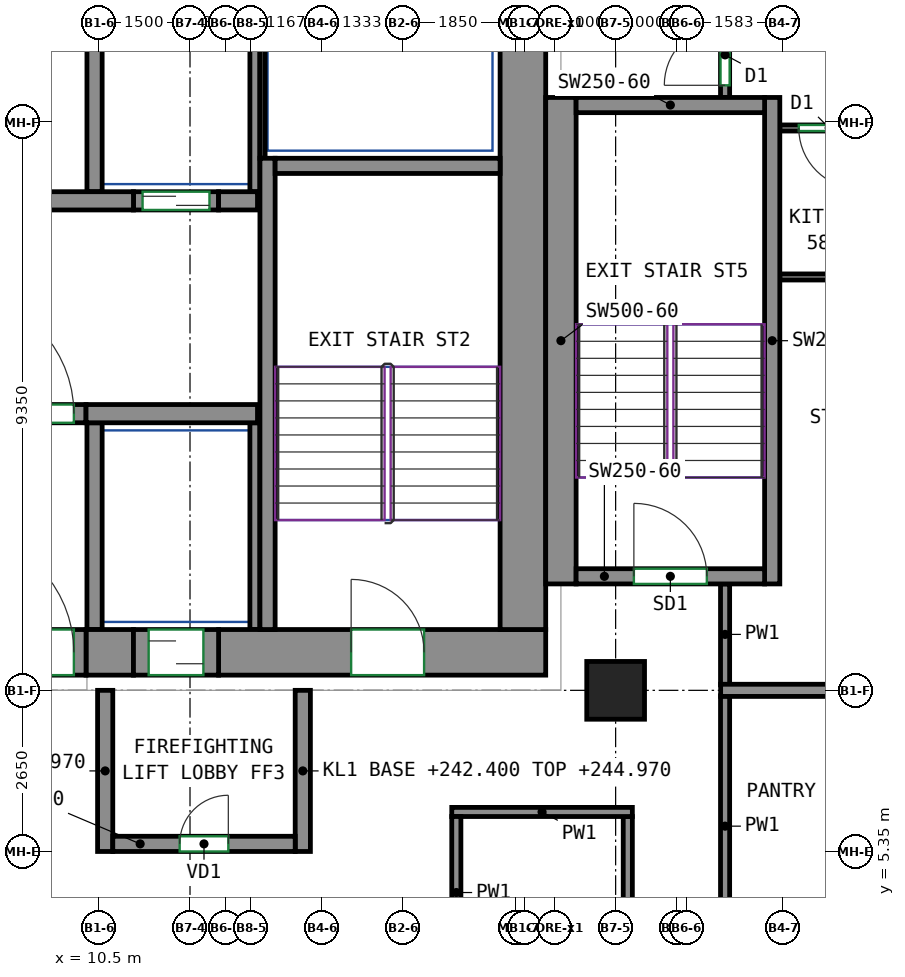
"""IFC4 building model, lengths in metres.
Left out: names, types, materials, properties, quantities, classifications, styles, units other than length and angle.
Written with IfcOpenShell. Run it as: python <this file> out.ifc"""

import sys

from ifc_helpers import new_model, si_unit, direction, frame, frame_2d, origin, origin_2d, place, context, subcontext, project, spatial, rectangle, extrude, source, transform, mapped, element, fill, save


model = new_model("IFC4")
c1 = context("Model", 3, precision=1e-05, world=origin(), true_north=direction((0.0, 1.0)))
c2 = subcontext(c1, "Body", "Model", "MODEL_VIEW")
j1 = project(units=[si_unit("LENGTHUNIT", "METRE"), si_unit("PLANEANGLEUNIT", "RADIAN")], contexts=[c1])
p1 = place(None, origin())
s1 = spatial("IfcSite", under=j1, at=p1, CompositionType="ELEMENT")
p2 = place(p1, origin())
s2 = spatial("IfcBuilding", under=s1, at=p2, CompositionType="ELEMENT")
p3 = place(p2, frame((0.0, 0.0, 242.4)))
s3 = spatial("IfcBuildingStorey", under=s2, at=p3, CompositionType="ELEMENT", Elevation=242.4)
m1 = source(origin(), c2, "Body", "SweptSolid", [
    extrude(rectangle(XDim=0.95, YDim=0.95, at=origin_2d()), origin(), (0.0, 0.0, 1.0), 3.12),
])
p4 = place(p3, frame((19.0, 8.0, 0.0), z_axis=(0.0, 0.0, 1.0), x_axis=(1.0, 0.0, 0.0)))
e1 = element("IfcColumn", 1, at=p4, inside=s3, PredefinedType="COLUMN", context=c2, shape_type="MappedRepresentation", body=[
    mapped(m1, transform((0.0, 0.0, 0.0))),
])
m2 = source(origin(), c2, "Body", "SweptSolid", [
    extrude(rectangle(XDim=0.78, YDim=0.75, at=frame_2d((0.39, 0.0))), origin(), (0.0, 0.0, 1.0), 3.12),
])
p5 = place(p3, frame((10.29, 8.625, 0.0), z_axis=(0.0, 0.0, 1.0), x_axis=(1.0, 0.0, 0.0)))
e2 = element("IfcWall", 2, at=p5, inside=s3, PredefinedType="SHEAR", context=c2, shape_type="MappedRepresentation", body=[
    mapped(m2, transform((0.0, 0.0, 0.0))),
])
m3 = source(origin(), c2, "Body", "SweptSolid", [
    extrude(rectangle(XDim=5.38, YDim=0.75, at=frame_2d((2.69, 0.0))), origin(), (0.0, 0.0, 1.0), 3.12),
])
p6 = place(p3, frame((12.47, 8.625, 0.0), z_axis=(0.0, 0.0, 1.0), x_axis=(1.0, 0.0, 0.0)))
e3 = element("IfcWall", 3, at=p6, inside=s3, PredefinedType="SHEAR", context=c2, shape_type="MappedRepresentation", body=[
    mapped(m3, transform((0.0, 0.0, 0.0))),
])
p7 = place(p6, frame((2.18, 0.0, 0.0)))
e4 = element("IfcOpeningElement", 4, at=p7, cuts=e3, PredefinedType="OPENING", context=c2, shape_type="SweptSolid", body=[
    extrude(rectangle(XDim=1.2, YDim=2.1, at=frame_2d((0.6, 1.05))), frame((0.0, 0.385, 0.0), z_axis=(0.0, -1.0, 0.0), x_axis=(1.0, 0.0, 0.0)), (0.0, 0.0, 1.0), 0.77),
])
m4 = source(origin(), c2, "Body", "SweptSolid", [
    extrude(rectangle(XDim=12.0, YDim=0.75, at=frame_2d((6.0, 0.0))), origin(), (0.0, 0.0, 1.0), 3.12),
])
p8 = place(p3, frame((17.475, 9.0, 0.0), z_axis=(0.0, 0.0, 1.0), x_axis=(0.0, 1.0, 0.0)))
e5 = element("IfcWall", 5, at=p8, inside=s3, PredefinedType="SHEAR", context=c2, shape_type="MappedRepresentation", body=[
    mapped(m4, transform((0.0, 0.0, 0.0))),
])
m5 = source(origin(), c2, "Body", "SweptSolid", [
    extrude(rectangle(XDim=7.75, YDim=0.25, at=frame_2d((3.875, 0.0))), origin(), (0.0, 0.0, 1.0), 3.12),
])
p9 = place(p3, frame((13.275, 9.0, 0.0), z_axis=(0.0, 0.0, 1.0), x_axis=(0.0, 1.0, 0.0)))
e6 = element("IfcWall", 6, at=p9, inside=s3, PredefinedType="SHEAR", context=c2, shape_type="MappedRepresentation", body=[
    mapped(m5, transform((0.0, 0.0, 0.0))),
])
m6 = source(origin(), c2, "Body", "SweptSolid", [
    extrude(rectangle(XDim=3.7, YDim=0.25, at=frame_2d((1.85, 0.0))), origin(), (0.0, 0.0, 1.0), 3.12),
])
p10 = place(p3, frame((13.4, 16.625, 0.0), z_axis=(0.0, 0.0, 1.0), x_axis=(1.0, 0.0, 0.0)))
e7 = element("IfcWall", 7, at=p10, inside=s3, PredefinedType="SHEAR", context=c2, shape_type="MappedRepresentation", body=[
    mapped(m6, transform((0.0, 0.0, 0.0))),
])
m7 = source(origin(), c2, "Body", "SweptSolid", [
    extrude(rectangle(XDim=8.0, YDim=0.5, at=frame_2d((4.0, 0.0))), origin(), (0.0, 0.0, 1.0), 3.12),
])
p11 = place(p3, frame((18.1, 9.75, 0.0), z_axis=(0.0, 0.0, 1.0), x_axis=(0.0, 1.0, 0.0)))
e8 = element("IfcWall", 8, at=p11, inside=s3, PredefinedType="SHEAR", context=c2, shape_type="MappedRepresentation", body=[
    mapped(m7, transform((0.0, 0.0, 0.0))),
])
m8 = source(origin(), c2, "Body", "SweptSolid", [
    extrude(rectangle(XDim=8.0, YDim=0.25, at=frame_2d((4.0, 0.0))), origin(), (0.0, 0.0, 1.0), 3.12),
])
p12 = place(p3, frame((21.575, 9.75, 0.0), z_axis=(0.0, 0.0, 1.0), x_axis=(0.0, 1.0, 0.0)))
e9 = element("IfcWall", 9, at=p12, inside=s3, PredefinedType="SHEAR", context=c2, shape_type="MappedRepresentation", body=[
    mapped(m8, transform((0.0, 0.0, 0.0))),
])
m9 = source(origin(), c2, "Body", "SweptSolid", [
    extrude(rectangle(XDim=3.1, YDim=0.25, at=frame_2d((1.55, 0.0))), origin(), (0.0, 0.0, 1.0), 3.12),
])
p13 = place(p3, frame((18.35, 9.875, 0.0), z_axis=(0.0, 0.0, 1.0), x_axis=(1.0, 0.0, 0.0)))
e10 = element("IfcWall", 10, at=p13, inside=s3, PredefinedType="SHEAR", context=c2, shape_type="MappedRepresentation", body=[
    mapped(m9, transform((0.0, 0.0, 0.0))),
])
p14 = place(p13, frame((0.95, 0.0, 0.0)))
e11 = element("IfcOpeningElement", 11, at=p14, cuts=e10, PredefinedType="OPENING", context=c2, shape_type="SweptSolid", body=[
    extrude(rectangle(XDim=1.2, YDim=2.1, at=frame_2d((0.6, 1.05))), frame((0.0, 0.135, 0.0), z_axis=(0.0, -1.0, 0.0), x_axis=(1.0, 0.0, 0.0)), (0.0, 0.0, 1.0), 0.27),
])
p15 = place(p3, frame((18.35, 17.625, 0.0), z_axis=(0.0, 0.0, 1.0), x_axis=(1.0, 0.0, 0.0)))
e12 = element("IfcWall", 12, at=p15, inside=s3, PredefinedType="SHEAR", context=c2, shape_type="MappedRepresentation", body=[
    mapped(m9, transform((0.0, 0.0, 0.0))),
])
m10 = source(origin(), c2, "Body", "SweptSolid", [
    extrude(rectangle(XDim=2.82, YDim=0.3, at=frame_2d((1.41, 0.0))), origin(), (0.0, 0.0, 1.0), 3.12),
])
p16 = place(p3, frame((10.29, 12.55, 0.0), z_axis=(0.0, 0.0, 1.0), x_axis=(1.0, 0.0, 0.0)))
e13 = element("IfcWall", 13, at=p16, inside=s3, PredefinedType="SHEAR", context=c2, shape_type="MappedRepresentation", body=[
    mapped(m10, transform((0.0, 0.0, 0.0))),
])
m11 = source(origin(), c2, "Body", "SweptSolid", [
    extrude(rectangle(XDim=22.08, YDim=0.3, at=frame_2d((11.04, 0.0))), origin(), (0.0, 0.0, 1.0), 3.12),
])
p17 = place(p3, frame((-11.01, 16.05, 0.0), z_axis=(0.0, 0.0, 1.0), x_axis=(1.0, 0.0, 0.0)))
e14 = element("IfcWall", 14, at=p17, inside=s3, PredefinedType="SHEAR", context=c2, shape_type="MappedRepresentation", body=[
    mapped(m11, transform((0.0, 0.0, 0.0))),
])
m12 = source(origin(), c2, "Body", "SweptSolid", [
    extrude(rectangle(XDim=0.64, YDim=0.3, at=frame_2d((0.32, 0.0))), origin(), (0.0, 0.0, 1.0), 3.12),
])
p18 = place(p3, frame((12.47, 16.05, 0.0), z_axis=(0.0, 0.0, 1.0), x_axis=(1.0, 0.0, 0.0)))
e15 = element("IfcWall", 15, at=p18, inside=s3, PredefinedType="SHEAR", context=c2, shape_type="MappedRepresentation", body=[
    mapped(m12, transform((0.0, 0.0, 0.0))),
])
m13 = source(origin(), c2, "Body", "SweptSolid", [
    extrude(rectangle(XDim=1.4, YDim=0.3, at=frame_2d((0.7, 0.0))), origin(), (0.0, 0.0, 1.0), 3.12),
])
p19 = place(p3, frame((11.07, 16.05, 0.0), z_axis=(0.0, 0.0, 1.0), x_axis=(1.0, 0.0, 0.0)))
e16 = element("IfcWall", 16, at=p19, inside=s3, PredefinedType="PARTITIONING", context=c2, shape_type="MappedRepresentation", body=[
    mapped(m13, transform((0.0, 0.0, 0.0))),
])
p20 = place(p19, frame((0.15, 0.0, 0.0)))
e17 = element("IfcOpeningElement", 17, at=p20, cuts=e16, PredefinedType="OPENING", context=c2, shape_type="SweptSolid", body=[
    extrude(rectangle(XDim=1.1, YDim=2.1, at=frame_2d((0.55, 1.05))), frame((0.0, 0.16, 0.0), z_axis=(0.0, -1.0, 0.0), x_axis=(1.0, 0.0, 0.0)), (0.0, 0.0, 1.0), 0.32),
])
m14 = source(origin(), c2, "Body", "SweptSolid", [
    extrude(rectangle(XDim=2.4, YDim=0.3, at=frame_2d((1.2, 0.0))), origin(), (0.0, 0.0, 1.0), 3.12),
])
p21 = place(p3, frame((7.89, 12.55, 0.0), z_axis=(0.0, 0.0, 1.0), x_axis=(1.0, 0.0, 0.0)))
e18 = element("IfcWall", 18, at=p21, inside=s3, PredefinedType="PARTITIONING", context=c2, shape_type="MappedRepresentation", body=[
    mapped(m14, transform((0.0, 0.0, 0.0))),
])
p22 = place(p21, frame((0.2, 0.0, 0.0)))
e19 = element("IfcOpeningElement", 19, at=p22, cuts=e18, PredefinedType="OPENING", context=c2, shape_type="SweptSolid", body=[
    extrude(rectangle(XDim=2.0, YDim=2.1, at=frame_2d((1.0, 1.05))), frame((0.0, 0.16, 0.0), z_axis=(0.0, -1.0, 0.0), x_axis=(1.0, 0.0, 0.0)), (0.0, 0.0, 1.0), 0.32),
])
m15 = source(origin(), c2, "Body", "SweptSolid", [
    extrude(rectangle(XDim=2.65, YDim=0.25, at=frame_2d((1.325, 0.0))), origin(), (0.0, 0.0, 1.0), 2.57),
])
for number, where, z_axis, x_axis in (
    (20, (10.605, 5.35, 0.0), (0.0, 0.0, 1.0), (0.0, 1.0, 0.0)),
    (21, (13.855, 5.35, 0.0), (0.0, 0.0, 1.0), (0.0, 1.0, 0.0)),
):
    element("IfcWall", number, at=place(p3, frame(where, z_axis=z_axis, x_axis=x_axis)), inside=s3, PredefinedType="PARTITIONING", context=c2, shape_type="MappedRepresentation", body=[
        mapped(m15, transform((0.0, 0.0, 0.0))),
    ])
m16 = source(origin(), c2, "Body", "SweptSolid", [
    extrude(rectangle(XDim=3.0, YDim=0.25, at=frame_2d((1.5, 0.0))), origin(), (0.0, 0.0, 1.0), 3.12),
])
p23 = place(p3, frame((10.73, 5.475, 0.0), z_axis=(0.0, 0.0, 1.0), x_axis=(1.0, 0.0, 0.0)))
e22 = element("IfcWall", 22, at=p23, inside=s3, PredefinedType="PARTITIONING", context=c2, shape_type="MappedRepresentation", body=[
    mapped(m16, transform((0.0, 0.0, 0.0))),
])
p24 = place(p23, frame((1.1, 0.0, 0.0)))
e23 = element("IfcOpeningElement", 23, at=p24, cuts=e22, PredefinedType="OPENING", context=c2, shape_type="SweptSolid", body=[
    extrude(rectangle(XDim=0.8, YDim=2.0, at=frame_2d((0.4, 1.0))), frame((0.0, 0.135, 0.0), z_axis=(0.0, -1.0, 0.0), x_axis=(1.0, 0.0, 0.0)), (0.0, 0.0, 1.0), 0.27),
])
m17 = source(origin(), c2, "Body", "SweptSolid", [
    extrude(rectangle(XDim=3.275, YDim=0.165, at=frame_2d((1.638, 0.0))), origin(), (0.0, 0.0, 1.0), 3.12),
])
p25 = place(p3, frame((13.067, 16.2, 0.0), z_axis=(0.0, 0.0, 1.0), x_axis=(0.0, 1.0, 0.0)))
e24 = element("IfcWall", 24, at=p25, inside=s3, PredefinedType="PARTITIONING", context=c2, shape_type="MappedRepresentation", body=[
    mapped(m17, transform((0.0, 0.0, 0.0))),
])
m18 = source(origin(), c2, "Body", "SweptSolid", [
    extrude(rectangle(XDim=3.275, YDim=0.25, at=frame_2d((1.638, 0.0))), origin(), (0.0, 0.0, 1.0), 3.12),
])
p26 = place(p3, frame((10.43, 16.2, 0.0), z_axis=(0.0, 0.0, 1.0), x_axis=(0.0, 1.0, 0.0)))
e25 = element("IfcWall", 25, at=p26, inside=s3, PredefinedType="PARTITIONING", context=c2, shape_type="MappedRepresentation", body=[
    mapped(m18, transform((0.0, 0.0, 0.0))),
])
m19 = source(origin(), c2, "Body", "SweptSolid", [
    extrude(rectangle(XDim=2.725, YDim=0.085, at=frame_2d((1.363, 0.0))), origin(), (0.0, 0.0, 1.0), 3.12),
])
p27 = place(p3, frame((13.192, 16.75, 0.0), z_axis=(0.0, 0.0, 1.0), x_axis=(0.0, 1.0, 0.0)))
e26 = element("IfcWall", 26, at=p27, inside=s3, PredefinedType="PARTITIONING", context=c2, shape_type="MappedRepresentation", body=[
    mapped(m19, transform((0.0, 0.0, 0.0))),
])
m20 = source(origin(), c2, "Body", "SweptSolid", [
    extrude(rectangle(XDim=3.4, YDim=0.25, at=frame_2d((1.7, 0.0))), origin(), (0.0, 0.0, 1.0), 3.12),
])
p28 = place(p3, frame((10.43, 9.0, 0.0), z_axis=(0.0, 0.0, 1.0), x_axis=(0.0, 1.0, 0.0)))
e27 = element("IfcWall", 27, at=p28, inside=s3, PredefinedType="PARTITIONING", context=c2, shape_type="MappedRepresentation", body=[
    mapped(m20, transform((0.0, 0.0, 0.0))),
])
m21 = source(origin(), c2, "Body", "SweptSolid", [
    extrude(rectangle(XDim=3.4, YDim=0.165, at=frame_2d((1.7, 0.0))), origin(), (0.0, 0.0, 1.0), 3.12),
])
p29 = place(p3, frame((13.067, 9.0, 0.0), z_axis=(0.0, 0.0, 1.0), x_axis=(0.0, 1.0, 0.0)))
e28 = element("IfcWall", 28, at=p29, inside=s3, PredefinedType="PARTITIONING", context=c2, shape_type="MappedRepresentation", body=[
    mapped(m21, transform((0.0, 0.0, 0.0))),
])
m22 = source(origin(), c2, "Body", "SweptSolid", [
    extrude(rectangle(XDim=2.4, YDim=0.75, at=frame_2d((1.2, 0.0))), origin(), (0.0, 0.0, 1.0), 2.7),
])
p30 = place(p3, frame((7.89, 8.625, 0.0), z_axis=(0.0, 0.0, 1.0), x_axis=(1.0, 0.0, 0.0)))
e29 = element("IfcWall", 29, at=p30, inside=s3, PredefinedType="PARTITIONING", context=c2, shape_type="MappedRepresentation", body=[
    mapped(m22, transform((0.0, 0.0, 0.0))),
])
p31 = place(p30, frame((0.2, 0.0, 0.0)))
e30 = element("IfcOpeningElement", 30, at=p31, cuts=e29, PredefinedType="OPENING", context=c2, shape_type="SweptSolid", body=[
    extrude(rectangle(XDim=2.0, YDim=2.1, at=frame_2d((1.0, 1.05))), frame((0.0, 0.385, 0.0), z_axis=(0.0, -1.0, 0.0), x_axis=(1.0, 0.0, 0.0)), (0.0, 0.0, 1.0), 0.77),
])
m23 = source(origin(), c2, "Body", "SweptSolid", [
    extrude(rectangle(XDim=1.4, YDim=0.75, at=frame_2d((0.7, 0.0))), origin(), (0.0, 0.0, 1.0), 2.7),
])
p32 = place(p3, frame((11.07, 8.625, 0.0), z_axis=(0.0, 0.0, 1.0), x_axis=(1.0, 0.0, 0.0)))
e31 = element("IfcWall", 31, at=p32, inside=s3, PredefinedType="PARTITIONING", context=c2, shape_type="MappedRepresentation", body=[
    mapped(m23, transform((0.0, 0.0, 0.0))),
])
p33 = place(p32, frame((0.25, 0.0, 0.0)))
e32 = element("IfcOpeningElement", 32, at=p33, cuts=e31, PredefinedType="OPENING", context=c2, shape_type="SweptSolid", body=[
    extrude(rectangle(XDim=0.9, YDim=2.1, at=frame_2d((0.45, 1.05))), frame((0.0, 0.385, 0.0), z_axis=(0.0, -1.0, 0.0), x_axis=(1.0, 0.0, 0.0)), (0.0, 0.0, 1.0), 0.77),
])
p34 = place(p3, frame((20.8, 3.623, 0.0), z_axis=(0.0, 0.0, 1.0), x_axis=(0.0, 1.0, 0.0)))
e33 = element("IfcWall", 33, at=p34, inside=s3, PredefinedType="PARTITIONING", context=c2, shape_type="SweptSolid", body=[
    extrude(rectangle(XDim=4.287, YDim=0.15, at=frame_2d((2.144, 0.0))), origin(), (0.0, 0.0, 1.0), 3.12),
])
p35 = place(p3, frame((20.8, 8.09, 0.0), z_axis=(0.0, 0.0, 1.0), x_axis=(0.0, 1.0, 0.0)))
e34 = element("IfcWall", 34, at=p35, inside=s3, PredefinedType="PARTITIONING", context=c2, shape_type="SweptSolid", body=[
    extrude(rectangle(XDim=1.66, YDim=0.15, at=frame_2d((0.83, 0.0))), origin(), (0.0, 0.0, 1.0), 3.12),
])
p36 = place(p3, frame((20.8, 17.75, 0.0), z_axis=(0.0, 0.0, 1.0), x_axis=(0.0, 1.0, 0.0)))
e35 = element("IfcWall", 35, at=p36, inside=s3, PredefinedType="PARTITIONING", context=c2, shape_type="SweptSolid", body=[
    extrude(rectangle(XDim=1.762, YDim=0.15, at=frame_2d((0.881, 0.0))), origin(), (0.0, 0.0, 1.0), 3.12),
])
p37 = place(p36, frame((0.2, 0.0, 0.0)))
e36 = element("IfcOpeningElement", 36, at=p37, cuts=e35, PredefinedType="OPENING", context=c2, shape_type="SweptSolid", body=[
    extrude(rectangle(XDim=1.0, YDim=2.1, at=frame_2d((0.5, 1.05))), frame((0.0, 0.085, 0.0), z_axis=(0.0, -1.0, 0.0), x_axis=(1.0, 0.0, 0.0)), (0.0, 0.0, 1.0), 0.17),
])
p38 = place(p3, frame((19.2, -0.358, 0.0), z_axis=(0.0, 0.0, 1.0), x_axis=(0.0, 1.0, 0.0)))
e37 = element("IfcWall", 37, at=p38, inside=s3, PredefinedType="PARTITIONING", context=c2, shape_type="SweptSolid", body=[
    extrude(rectangle(XDim=6.283, YDim=0.15, at=frame_2d((3.142, 0.0))), origin(), (0.0, 0.0, 1.0), 2.57),
])
p39 = place(p3, frame((16.305, 6.0, 0.0), z_axis=(0.0, 0.0, 1.0), x_axis=(1.0, 0.0, 0.0)))
e38 = element("IfcWall", 38, at=p39, inside=s3, PredefinedType="PARTITIONING", context=c2, shape_type="SweptSolid", body=[
    extrude(rectangle(XDim=2.97, YDim=0.15, at=frame_2d((1.485, 0.0))), origin(), (0.0, 0.0, 1.0), 3.12),
])
p40 = place(p3, frame((16.38, 3.425, 0.0), z_axis=(0.0, 0.0, 1.0), x_axis=(0.0, 1.0, 0.0)))
e39 = element("IfcWall", 39, at=p40, inside=s3, PredefinedType="PARTITIONING", context=c2, shape_type="SweptSolid", body=[
    extrude(rectangle(XDim=2.5, YDim=0.15, at=frame_2d((1.25, 0.0))), origin(), (0.0, 0.0, 1.0), 3.12),
])
p41 = place(p3, frame((20.727, 8.0, 0.0), z_axis=(0.0, 0.0, 1.0), x_axis=(1.0, 0.0, 0.0)))
e40 = element("IfcWall", 40, at=p41, inside=s3, PredefinedType="PARTITIONING", context=c2, shape_type="SweptSolid", body=[
    extrude(rectangle(XDim=7.973, YDim=0.2, at=frame_2d((3.986, 0.0))), origin(), (0.0, 0.0, 1.0), 2.57),
])
p42 = place(p3, frame((23.501, 14.798, 0.0), z_axis=(0.0, 0.0, 1.0), x_axis=(-1.0, 0.0, 0.0)))
e41 = element("IfcWall", 41, at=p42, inside=s3, PredefinedType="PARTITIONING", context=c2, shape_type="SweptSolid", body=[
    extrude(rectangle(XDim=1.801, YDim=0.1, at=frame_2d((0.9, 0.0))), origin(), (0.0, 0.0, 1.0), 3.12),
])
p43 = place(p3, frame((23.55, 17.248, 0.0), z_axis=(0.0, 0.0, 1.0), x_axis=(-1.0, 0.0, 0.0)))
e42 = element("IfcWall", 42, at=p43, inside=s3, PredefinedType="PARTITIONING", context=c2, shape_type="SweptSolid", body=[
    extrude(rectangle(XDim=1.85, YDim=0.1, at=frame_2d((0.925, 0.0))), origin(), (0.0, 0.0, 1.0), 3.12),
])
p44 = place(p43, frame((0.538, 0.0, 0.0)))
e43 = element("IfcOpeningElement", 43, at=p44, cuts=e42, PredefinedType="OPENING", context=c2, shape_type="SweptSolid", body=[
    extrude(rectangle(XDim=1.0, YDim=2.1, at=frame_2d((0.5, 1.05))), frame((0.0, 0.06, 0.0), z_axis=(0.0, -1.0, 0.0), x_axis=(1.0, 0.0, 0.0)), (0.0, 0.0, 1.0), 0.12),
])
p45 = place(p22, origin())
e44 = element("IfcDoor", 44, at=p45, inside=s3, OperationType="DOUBLE_DOOR_SINGLE_SWING", PredefinedType="DOOR", context=c2, shape_type="SweptSolid", body=[
    extrude(rectangle(XDim=2.0, YDim=2.1, at=frame_2d((1.0, 1.05))), frame((0.0, 0.025, 0.0), z_axis=(0.0, -1.0, 0.0), x_axis=(1.0, 0.0, 0.0)), (0.0, 0.0, 1.0), 0.05),
])
fill(e19, e44)
p46 = place(p31, origin())
e45 = element("IfcDoor", 45, at=p46, inside=s3, OperationType="DOUBLE_DOOR_SINGLE_SWING", PredefinedType="DOOR", context=c2, shape_type="SweptSolid", body=[
    extrude(rectangle(XDim=2.0, YDim=2.1, at=frame_2d((1.0, 1.05))), frame((0.0, 0.28, 0.0), z_axis=(0.0, -1.0, 0.0), x_axis=(1.0, 0.0, 0.0)), (0.0, 0.0, 1.0), 0.05),
])
fill(e30, e45)
p47 = place(p24, origin())
e46 = element("IfcDoor", 46, at=p47, inside=s3, OperationType="SINGLE_SWING_RIGHT", PredefinedType="DOOR", context=c2, shape_type="SweptSolid", body=[
    extrude(rectangle(XDim=0.8, YDim=2.0, at=frame_2d((0.4, 1.0))), frame((0.0, 0.025, 0.0), z_axis=(0.0, -1.0, 0.0), x_axis=(1.0, 0.0, 0.0)), (0.0, 0.0, 1.0), 0.05),
])
fill(e23, e46)
p48 = place(p33, origin())
e47 = element("IfcDoor", 47, at=p48, inside=s3, OperationType="SLIDING_TO_LEFT", PredefinedType="DOOR", context=c2, shape_type="SweptSolid", body=[
    extrude(rectangle(XDim=0.9, YDim=2.1, at=frame_2d((0.45, 1.05))), frame((0.0, 0.28, 0.0), z_axis=(0.0, -1.0, 0.0), x_axis=(1.0, 0.0, 0.0)), (0.0, 0.0, 1.0), 0.05),
])
fill(e32, e47)
p49 = place(p20, origin())
e48 = element("IfcDoor", 48, at=p49, inside=s3, OperationType="DOUBLE_DOOR_SLIDING", PredefinedType="DOOR", context=c2, shape_type="SweptSolid", body=[
    extrude(rectangle(XDim=1.1, YDim=2.1, at=frame_2d((0.55, 1.05))), frame((0.0, 0.025, 0.0), z_axis=(0.0, -1.0, 0.0), x_axis=(1.0, 0.0, 0.0)), (0.0, 0.0, 1.0), 0.05),
])
fill(e17, e48)
p50 = place(p7, origin())
e49 = element("IfcDoor", 49, at=p50, inside=s3, OperationType="DOUBLE_DOOR_SINGLE_SWING", PredefinedType="DOOR", context=c2, shape_type="SweptSolid", body=[
    extrude(rectangle(XDim=1.2, YDim=2.1, at=frame_2d((0.6, 1.05))), frame((0.0, 0.28, 0.0), z_axis=(0.0, -1.0, 0.0), x_axis=(1.0, 0.0, 0.0)), (0.0, 0.0, 1.0), 0.05),
])
fill(e4, e49)
p51 = place(p14, origin())
e50 = element("IfcDoor", 50, at=p51, inside=s3, OperationType="DOUBLE_DOOR_SINGLE_SWING", PredefinedType="DOOR", context=c2, shape_type="SweptSolid", body=[
    extrude(rectangle(XDim=1.2, YDim=2.1, at=frame_2d((0.6, 1.05))), frame((0.0, 0.025, 0.0), z_axis=(0.0, -1.0, 0.0), x_axis=(1.0, 0.0, 0.0)), (0.0, 0.0, 1.0), 0.05),
])
fill(e11, e50)
p52 = place(p44, origin())
e51 = element("IfcDoor", 51, at=p52, inside=s3, OperationType="SINGLE_SWING_LEFT", PredefinedType="DOOR", context=c2, shape_type="SweptSolid", body=[
    extrude(rectangle(XDim=1.0, YDim=2.1, at=frame_2d((0.5, 1.05))), frame((0.0, 0.025, 0.0), z_axis=(0.0, -1.0, 0.0), x_axis=(1.0, 0.0, 0.0)), (0.0, 0.0, 1.0), 0.05),
])
fill(e43, e51)
p53 = place(p37, origin())
e52 = element("IfcDoor", 52, at=p53, inside=s3, OperationType="SINGLE_SWING_LEFT", PredefinedType="DOOR", context=c2, shape_type="SweptSolid", body=[
    extrude(rectangle(XDim=1.0, YDim=2.1, at=frame_2d((0.5, 1.05))), frame((0.0, 0.025, 0.0), z_axis=(0.0, -1.0, 0.0), x_axis=(1.0, 0.0, 0.0)), (0.0, 0.0, 1.0), 0.05),
])
fill(e36, e52)
save(model, sys.argv[1])
